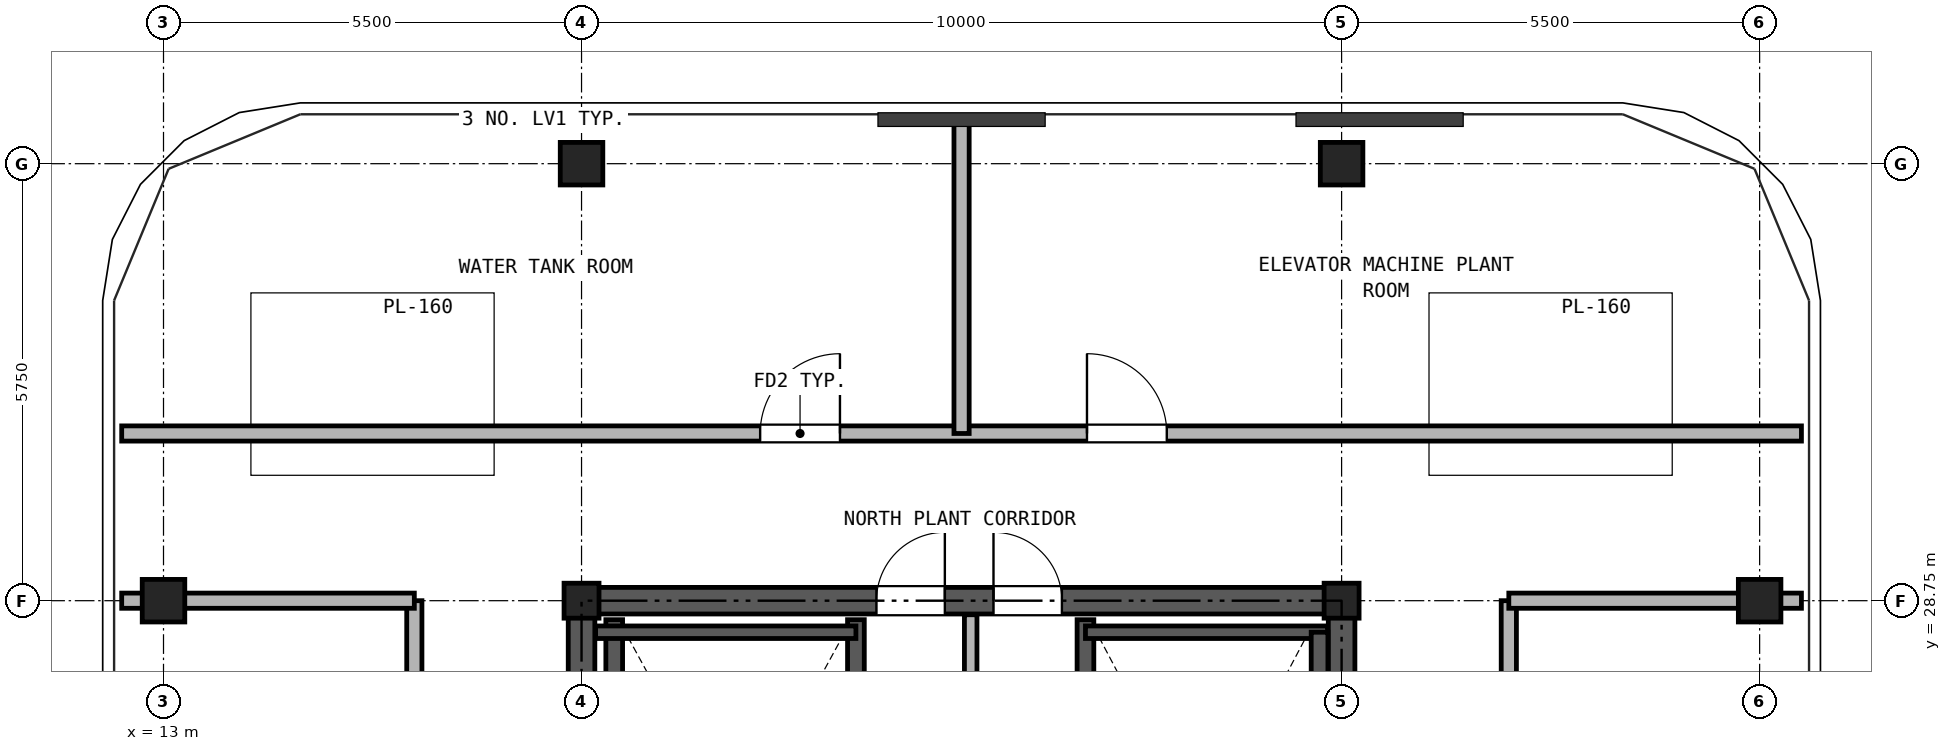
"""IFC4 building model, lengths in metres.
Left out: names, types, materials, properties, quantities, classifications, styles, units other than length and angle.
Written with IfcOpenShell. Run it as: python <this file> out.ifc"""

import sys

from ifc_helpers import new_model, si_unit, direction, frame, frame_2d, origin, origin_2d, place, context, subcontext, project, spatial, rectangle, hollow_rectangle, extrude, source, transform, mapped, element, fill, save


model = new_model("IFC4")
c1 = context("Model", 3, precision=1e-05, world=origin(), true_north=direction((0.0, 1.0)))
c2 = subcontext(c1, "Body", "Model", "MODEL_VIEW")
j1 = project(units=[si_unit("LENGTHUNIT", "METRE"), si_unit("PLANEANGLEUNIT", "RADIAN")], contexts=[c1])
p1 = place(None, origin())
s1 = spatial("IfcSite", under=j1, at=p1, CompositionType="ELEMENT")
p2 = place(p1, origin())
s2 = spatial("IfcBuilding", under=s1, at=p2, CompositionType="ELEMENT")
p3 = place(p2, frame((0.0, 0.0, 292.9)))
s3 = spatial("IfcBuildingStorey", under=s2, at=p3, CompositionType="ELEMENT", Elevation=292.9)
m1 = source(origin(), c2, "Body", "SweptSolid", [
    extrude(hollow_rectangle(XDim=0.56, YDim=0.56, WallThickness=0.03, at=origin_2d()), origin(), (0.0, 0.0, 1.0), 3.312),
])
for number, where, z_axis, x_axis in (
    (1, (18.5, 34.5, 0.0), (0.0, 0.0, 1.0), (1.0, 0.0, 0.0)),
    (2, (28.5, 34.5, 0.0), (0.0, 0.0, 1.0), (1.0, 0.0, 0.0)),
    (3, (13.0, 28.75, 0.0), (0.0, 0.0, 1.0), (1.0, 0.0, 0.0)),
    (4, (34.0, 28.75, 0.0), (0.0, 0.0, 1.0), (1.0, 0.0, 0.0)),
):
    element("IfcColumn", number, at=place(p3, frame(where, z_axis=z_axis, x_axis=x_axis)), inside=s3, PredefinedType="COLUMN", context=c2, shape_type="MappedRepresentation", body=[
        mapped(m1, transform((0.0, 0.0, 0.0), x_axis=(1.0, 0.0, 0.0), y_axis=(0.0, 1.0, 0.0), z_axis=(0.0, 0.0, 1.0), scale=1.0)),
    ])
m2 = source(origin(), c2, "Body", "SweptSolid", [
    extrude(hollow_rectangle(XDim=0.46, YDim=0.46, WallThickness=0.025, at=origin_2d()), origin(), (0.0, 0.0, 1.0), 3.312),
])
for number, where, z_axis, x_axis in (
    (5, (18.5, 28.75, 0.0), (0.0, 0.0, 1.0), (1.0, 0.0, 0.0)),
    (6, (28.5, 28.75, 0.0), (0.0, 0.0, 1.0), (1.0, 0.0, 0.0)),
):
    element("IfcColumn", number, at=place(p3, frame(where, z_axis=z_axis, x_axis=x_axis)), inside=s3, PredefinedType="COLUMN", context=c2, shape_type="MappedRepresentation", body=[
        mapped(m2, transform((0.0, 0.0, 0.0), x_axis=(1.0, 0.0, 0.0), y_axis=(0.0, 1.0, 0.0), z_axis=(0.0, 0.0, 1.0), scale=1.0)),
    ])
p4 = place(p3, frame((18.325, 28.75, 0.0), z_axis=(0.0, 0.0, 1.0), x_axis=(1.0, 0.0, 0.0)))
e7 = element("IfcWall", 7, at=p4, inside=s3, PredefinedType="SHEAR", context=c2, shape_type="SweptSolid", body=[
    extrude(rectangle(XDim=10.35, YDim=0.35, at=frame_2d((5.175, 0.0))), origin(), (0.0, 0.0, 1.0), 3.34),
])
p5 = place(p4, frame((4.055, 0.0, 0.0)))
e8 = element("IfcOpeningElement", 8, at=p5, cuts=e7, PredefinedType="OPENING", context=c2, shape_type="SweptSolid", body=[
    extrude(rectangle(XDim=0.9, YDim=2.05, at=frame_2d((0.45, 1.025))), frame((0.0, 0.185, 0.0), z_axis=(0.0, -1.0, 0.0), x_axis=(1.0, 0.0, 0.0)), (0.0, 0.0, 1.0), 0.37),
])
p6 = place(p4, frame((5.595, 0.0, 0.0)))
e9 = element("IfcOpeningElement", 9, at=p6, cuts=e7, PredefinedType="OPENING", context=c2, shape_type="SweptSolid", body=[
    extrude(rectangle(XDim=0.9, YDim=2.05, at=frame_2d((0.45, 1.025))), frame((0.0, 0.185, 0.0), z_axis=(0.0, -1.0, 0.0), x_axis=(1.0, 0.0, 0.0)), (0.0, 0.0, 1.0), 0.37),
])
p7 = place(p3, frame((18.5, 11.675, 0.0), z_axis=(0.0, 0.0, 1.0), x_axis=(0.0, 1.0, 0.0)))
e10 = element("IfcWall", 10, at=p7, inside=s3, PredefinedType="SHEAR", context=c2, shape_type="SweptSolid", body=[
    extrude(rectangle(XDim=16.9, YDim=0.35, at=frame_2d((8.45, 0.0))), origin(), (0.0, 0.0, 1.0), 3.34),
])
p8 = place(p7, frame((7.475, 0.0, 0.0)))
e11 = element("IfcOpeningElement", 11, at=p8, cuts=e10, PredefinedType="OPENING", context=c2, shape_type="SweptSolid", body=[
    extrude(rectangle(XDim=1.15, YDim=2.2, at=frame_2d((0.575, 1.1))), frame((0.0, 0.185, 0.0), z_axis=(0.0, -1.0, 0.0), x_axis=(1.0, 0.0, 0.0)), (0.0, 0.0, 1.0), 0.37),
])
p9 = place(p3, frame((28.5, 11.675, 0.0), z_axis=(0.0, 0.0, 1.0), x_axis=(0.0, 1.0, 0.0)))
e12 = element("IfcWall", 12, at=p9, inside=s3, PredefinedType="SHEAR", context=c2, shape_type="SweptSolid", body=[
    extrude(rectangle(XDim=16.9, YDim=0.35, at=frame_2d((8.45, 0.0))), origin(), (0.0, 0.0, 1.0), 3.34),
])
p10 = place(p9, frame((7.475, 0.0, 0.0)))
e13 = element("IfcOpeningElement", 13, at=p10, cuts=e12, PredefinedType="OPENING", context=c2, shape_type="SweptSolid", body=[
    extrude(rectangle(XDim=1.15, YDim=2.2, at=frame_2d((0.575, 1.1))), frame((0.0, 0.185, 0.0), z_axis=(0.0, -1.0, 0.0), x_axis=(1.0, 0.0, 0.0)), (0.0, 0.0, 1.0), 0.37),
])
for number, where, z_axis, x_axis in (
    (14, (18.93, 21.39, 0.0), (0.0, 0.0, 1.0), (0.0, 1.0, 0.0)),
    (15, (22.11, 21.39, 0.0), (0.0, 0.0, 1.0), (0.0, 1.0, 0.0)),
    (16, (25.13, 21.39, 0.0), (0.0, 0.0, 1.0), (0.0, 1.0, 0.0)),
):
    element("IfcWall", number, at=place(p3, frame(where, z_axis=z_axis, x_axis=x_axis)), inside=s3, PredefinedType="SOLIDWALL", context=c2, shape_type="SweptSolid", body=[
        extrude(rectangle(XDim=7.11, YDim=0.22, at=frame_2d((3.555, 0.0))), origin(), (0.0, 0.0, 1.0), 3.34),
    ])
p11 = place(p3, frame((18.685, 28.335, 0.0), z_axis=(0.0, 0.0, 1.0), x_axis=(1.0, 0.0, 0.0)))
e17 = element("IfcWall", 17, at=p11, inside=s3, PredefinedType="PARTITIONING", context=c2, shape_type="SweptSolid", body=[
    extrude(rectangle(XDim=3.425, YDim=0.165, at=frame_2d((1.712, 0.0))), origin(), (0.0, 0.0, 1.0), 3.34),
])
p12 = place(p3, frame((25.13, 28.335, 0.0), z_axis=(0.0, 0.0, 1.0), x_axis=(1.0, 0.0, 0.0)))
e18 = element("IfcWall", 18, at=p12, inside=s3, PredefinedType="PARTITIONING", context=c2, shape_type="SweptSolid", body=[
    extrude(rectangle(XDim=3.185, YDim=0.165, at=frame_2d((1.593, 0.0))), origin(), (0.0, 0.0, 1.0), 3.34),
])
p13 = place(p3, frame((28.21, 21.39, 0.0), z_axis=(0.0, 0.0, 1.0), x_axis=(0.0, 1.0, 0.0)))
e19 = element("IfcWall", 19, at=p13, inside=s3, PredefinedType="SOLIDWALL", context=c2, shape_type="SweptSolid", body=[
    extrude(rectangle(XDim=6.945, YDim=0.22, at=frame_2d((3.473, 0.0))), origin(), (0.0, 0.0, 1.0), 3.34),
])
p14 = place(p3, frame((23.62, 24.4, 0.0), z_axis=(0.0, 0.0, 1.0), x_axis=(0.0, 1.0, 0.0)))
e20 = element("IfcWall", 20, at=p14, inside=s3, PredefinedType="PARTITIONING", context=c2, shape_type="SweptSolid", body=[
    extrude(rectangle(XDim=4.165, YDim=0.165, at=frame_2d((2.083, 0.0))), origin(), (0.0, 0.0, 1.0), 3.34),
])
p15 = place(p3, frame((12.45, 30.95, 0.0), z_axis=(0.0, 0.0, 1.0), x_axis=(1.0, 0.0, 0.0)))
e21 = element("IfcWall", 21, at=p15, inside=s3, PredefinedType="PARTITIONING", context=c2, shape_type="SweptSolid", body=[
    extrude(rectangle(XDim=22.1, YDim=0.2, at=frame_2d((11.05, 0.0))), origin(), (0.0, 0.0, 1.0), 3.34),
])
p16 = place(p15, frame((8.4, 0.0, 0.0)))
e22 = element("IfcOpeningElement", 22, at=p16, cuts=e21, PredefinedType="OPENING", context=c2, shape_type="SweptSolid", body=[
    extrude(rectangle(XDim=1.05, YDim=2.15, at=frame_2d((0.525, 1.075))), frame((0.0, 0.11, 0.0), z_axis=(0.0, -1.0, 0.0), x_axis=(1.0, 0.0, 0.0)), (0.0, 0.0, 1.0), 0.22),
])
p17 = place(p15, frame((12.7, 0.0, 0.0)))
e23 = element("IfcOpeningElement", 23, at=p17, cuts=e21, PredefinedType="OPENING", context=c2, shape_type="SweptSolid", body=[
    extrude(rectangle(XDim=1.05, YDim=2.15, at=frame_2d((0.525, 1.075))), frame((0.0, 0.11, 0.0), z_axis=(0.0, -1.0, 0.0), x_axis=(1.0, 0.0, 0.0)), (0.0, 0.0, 1.0), 0.22),
])
p18 = place(p3, frame((16.3, 8.9, 0.0), z_axis=(0.0, 0.0, 1.0), x_axis=(0.0, 1.0, 0.0)))
e24 = element("IfcWall", 24, at=p18, inside=s3, PredefinedType="PARTITIONING", context=c2, shape_type="SweptSolid", body=[
    extrude(rectangle(XDim=19.85, YDim=0.2, at=frame_2d((9.925, 0.0))), origin(), (0.0, 0.0, 1.0), 3.34),
])
p19 = place(p18, frame((4.55, 0.0, 0.0)))
e25 = element("IfcOpeningElement", 25, at=p19, cuts=e24, PredefinedType="OPENING", context=c2, shape_type="SweptSolid", body=[
    extrude(rectangle(XDim=1.05, YDim=2.15, at=frame_2d((0.525, 1.075))), frame((0.0, 0.11, 0.0), z_axis=(0.0, -1.0, 0.0), x_axis=(1.0, 0.0, 0.0)), (0.0, 0.0, 1.0), 0.22),
])
p20 = place(p18, frame((14.475, 0.0, 0.0)))
e26 = element("IfcOpeningElement", 26, at=p20, cuts=e24, PredefinedType="OPENING", context=c2, shape_type="SweptSolid", body=[
    extrude(rectangle(XDim=1.05, YDim=2.15, at=frame_2d((0.525, 1.075))), frame((0.0, 0.11, 0.0), z_axis=(0.0, -1.0, 0.0), x_axis=(1.0, 0.0, 0.0)), (0.0, 0.0, 1.0), 0.22),
])
p21 = place(p3, frame((30.7, 8.9, 0.0), z_axis=(0.0, 0.0, 1.0), x_axis=(0.0, 1.0, 0.0)))
e27 = element("IfcWall", 27, at=p21, inside=s3, PredefinedType="PARTITIONING", context=c2, shape_type="SweptSolid", body=[
    extrude(rectangle(XDim=19.85, YDim=0.2, at=frame_2d((9.925, 0.0))), origin(), (0.0, 0.0, 1.0), 3.34),
])
p22 = place(p21, frame((9.425, 0.0, 0.0)))
e28 = element("IfcOpeningElement", 28, at=p22, cuts=e27, PredefinedType="OPENING", context=c2, shape_type="SweptSolid", body=[
    extrude(rectangle(XDim=1.05, YDim=2.15, at=frame_2d((0.525, 1.075))), frame((0.0, 0.11, 0.0), z_axis=(0.0, -1.0, 0.0), x_axis=(1.0, 0.0, 0.0)), (0.0, 0.0, 1.0), 0.22),
])
for number, where, z_axis, x_axis in (
    (29, (12.45, 28.75, 0.0), (0.0, 0.0, 1.0), (1.0, 0.0, 0.0)),
    (30, (30.7, 28.75, 0.0), (0.0, 0.0, 1.0), (1.0, 0.0, 0.0)),
):
    element("IfcWall", number, at=place(p3, frame(where, z_axis=z_axis, x_axis=x_axis)), inside=s3, PredefinedType="PARTITIONING", context=c2, shape_type="SweptSolid", body=[
        extrude(rectangle(XDim=3.85, YDim=0.2, at=frame_2d((1.925, 0.0))), origin(), (0.0, 0.0, 1.0), 2.865),
    ])
p23 = place(p3, frame((23.5, 30.95, 0.0), z_axis=(0.0, 0.0, 1.0), x_axis=(0.0, 1.0, 0.0)))
e31 = element("IfcWall", 31, at=p23, inside=s3, PredefinedType="PARTITIONING", context=c2, shape_type="SweptSolid", body=[
    extrude(rectangle(XDim=4.1, YDim=0.2, at=frame_2d((2.05, 0.0))), origin(), (0.0, 0.0, 1.0), 3.34),
])
p24 = place(p5, origin())
e32 = element("IfcDoor", 32, at=p24, inside=s3, OperationType="SINGLE_SWING_RIGHT", PredefinedType="DOOR", context=c2, shape_type="SweptSolid", body=[
    extrude(rectangle(XDim=0.9, YDim=2.05, at=frame_2d((0.45, 1.025))), frame((0.0, 0.025, 0.0), z_axis=(0.0, -1.0, 0.0), x_axis=(1.0, 0.0, 0.0)), (0.0, 0.0, 1.0), 0.05),
])
fill(e8, e32)
p25 = place(p6, origin())
e33 = element("IfcDoor", 33, at=p25, inside=s3, OperationType="SINGLE_SWING_LEFT", PredefinedType="DOOR", context=c2, shape_type="SweptSolid", body=[
    extrude(rectangle(XDim=0.9, YDim=2.05, at=frame_2d((0.45, 1.025))), frame((0.0, 0.025, 0.0), z_axis=(0.0, -1.0, 0.0), x_axis=(1.0, 0.0, 0.0)), (0.0, 0.0, 1.0), 0.05),
])
fill(e9, e33)
p26 = place(p16, origin())
e34 = element("IfcDoor", 34, at=p26, inside=s3, OperationType="SINGLE_SWING_RIGHT", PredefinedType="DOOR", context=c2, shape_type="SweptSolid", body=[
    extrude(rectangle(XDim=1.05, YDim=2.15, at=frame_2d((0.525, 1.075))), frame((0.0, 0.025, 0.0), z_axis=(0.0, -1.0, 0.0), x_axis=(1.0, 0.0, 0.0)), (0.0, 0.0, 1.0), 0.05),
])
fill(e22, e34)
p27 = place(p17, origin())
e35 = element("IfcDoor", 35, at=p27, inside=s3, OperationType="SINGLE_SWING_LEFT", PredefinedType="DOOR", context=c2, shape_type="SweptSolid", body=[
    extrude(rectangle(XDim=1.05, YDim=2.15, at=frame_2d((0.525, 1.075))), frame((0.0, 0.025, 0.0), z_axis=(0.0, -1.0, 0.0), x_axis=(1.0, 0.0, 0.0)), (0.0, 0.0, 1.0), 0.05),
])
fill(e23, e35)
save(model, sys.argv[1])
